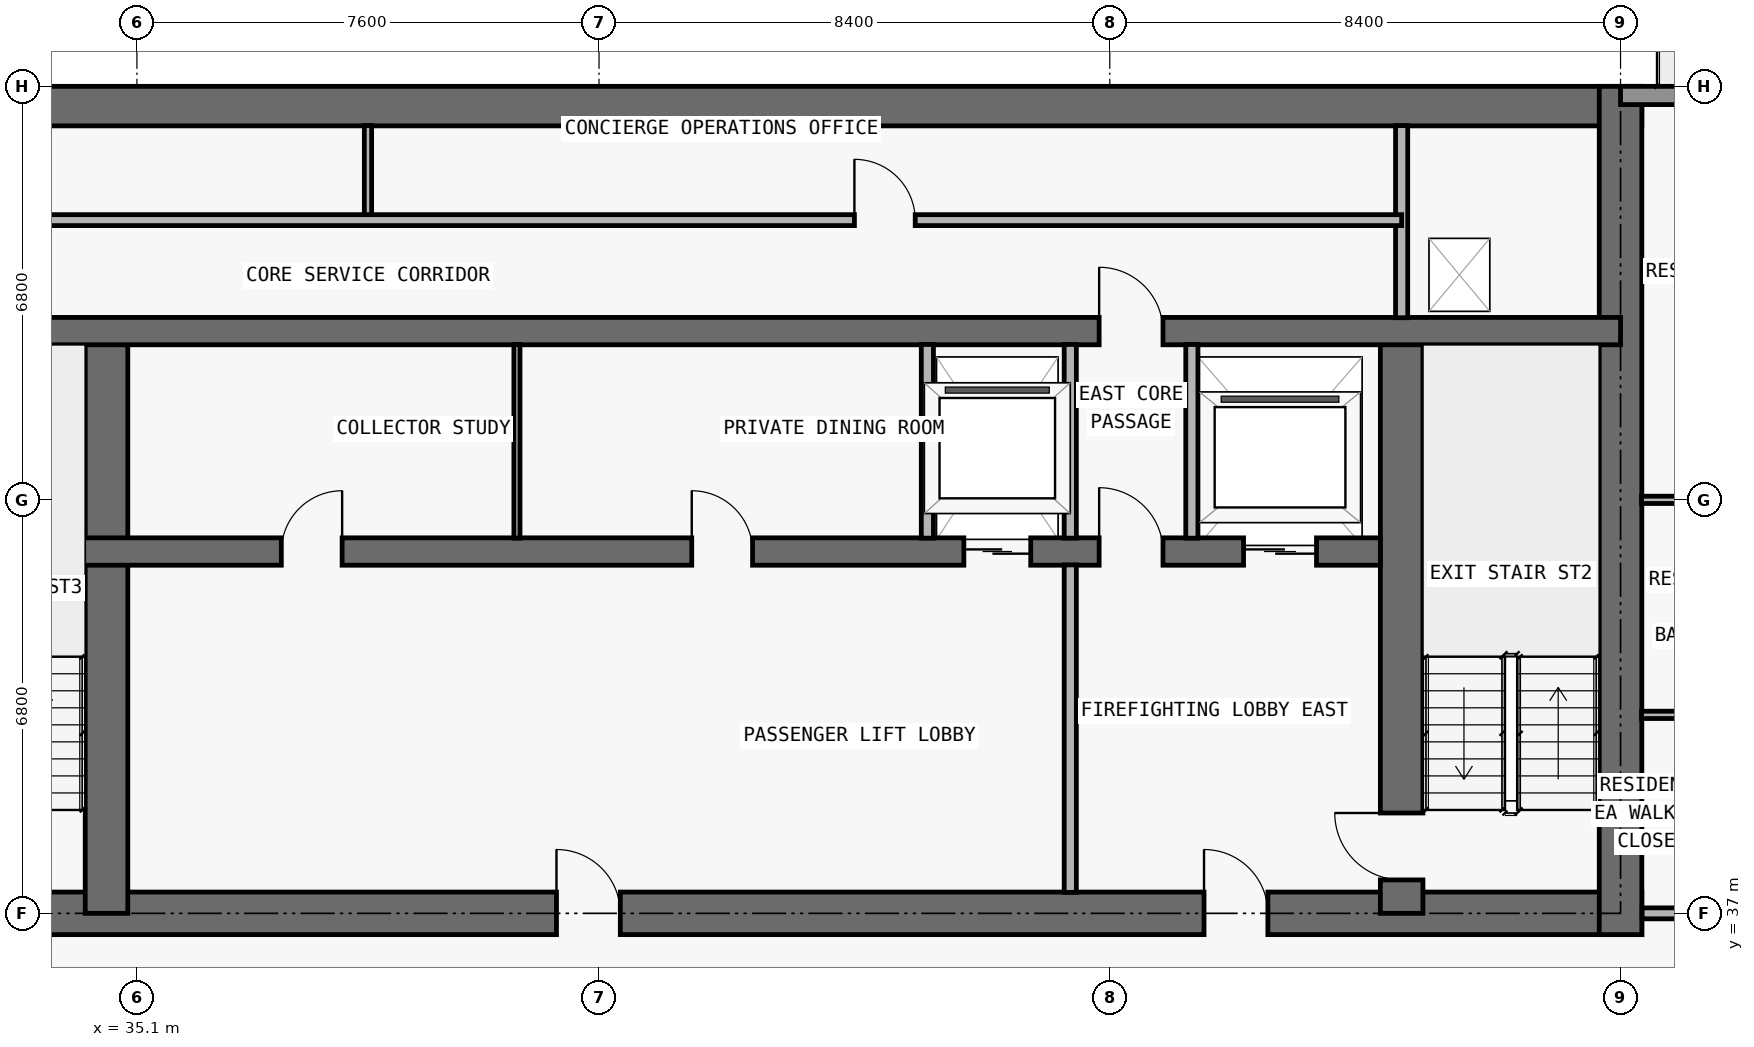
"""IFC4 building model, lengths in metres.
Left out: names, types, materials, properties, quantities, classifications, styles, units other than length and angle.
Written with IfcOpenShell. Run it as: python <this file> out.ifc"""

import sys

from ifc_helpers import new_model, si_unit, direction, frame, frame_2d, origin, place, context, subcontext, project, spatial, rectangle, extrude, element, fill, save


model = new_model("IFC4")
c1 = context("Model", 3, precision=1e-05, world=origin(), true_north=direction((0.0, 1.0)))
c2 = subcontext(c1, "Body", "Model", "MODEL_VIEW")
j1 = project(units=[si_unit("LENGTHUNIT", "METRE"), si_unit("PLANEANGLEUNIT", "RADIAN")], contexts=[c1])
p1 = place(None, origin())
s1 = spatial("IfcSite", under=j1, at=p1, CompositionType="ELEMENT")
p2 = place(p1, origin())
s2 = spatial("IfcBuilding", under=s1, at=p2, CompositionType="ELEMENT")
p3 = place(p2, frame((0.0, 0.0, 256.2)))
s3 = spatial("IfcBuildingStorey", under=s2, at=p3, CompositionType="ELEMENT", Elevation=256.2)
p4 = place(p3, frame((17.95, 37.0, 0.0), z_axis=(0.0, 0.0, 1.0), x_axis=(1.0, 0.0, 0.0)))
e1 = element("IfcWall", 1, at=p4, inside=s3, PredefinedType="SHEAR", context=c2, shape_type="SweptSolid", body=[
    extrude(rectangle(XDim=41.9, YDim=0.7, at=frame_2d((20.95, 0.0))), origin(), (0.0, 0.0, 1.0), 3.05),
])
p5 = place(p4, frame((14.35, 0.0, 0.0)))
e2 = element("IfcOpeningElement", 2, at=p5, cuts=e1, PredefinedType="OPENING", context=c2, shape_type="SweptSolid", body=[
    extrude(rectangle(XDim=1.1, YDim=2.15, at=frame_2d((0.55, 1.075))), frame((0.0, 0.36, 0.0), z_axis=(0.0, -1.0, 0.0), x_axis=(1.0, 0.0, 0.0)), (0.0, 0.0, 1.0), 0.72),
])
p6 = place(p4, frame((6.2, 0.0, 0.0)))
e3 = element("IfcOpeningElement", 3, at=p6, cuts=e1, PredefinedType="OPENING", context=c2, shape_type="SweptSolid", body=[
    extrude(rectangle(XDim=1.05, YDim=2.15, at=frame_2d((0.525, 1.075))), frame((0.0, 0.36, 0.0), z_axis=(0.0, -1.0, 0.0), x_axis=(1.0, 0.0, 0.0)), (0.0, 0.0, 1.0), 0.72),
])
p7 = place(p4, frame((34.7, 0.0, 0.0)))
e4 = element("IfcOpeningElement", 4, at=p7, cuts=e1, PredefinedType="OPENING", context=c2, shape_type="SweptSolid", body=[
    extrude(rectangle(XDim=1.05, YDim=2.15, at=frame_2d((0.525, 1.075))), frame((0.0, 0.36, 0.0), z_axis=(0.0, -1.0, 0.0), x_axis=(1.0, 0.0, 0.0)), (0.0, 0.0, 1.0), 0.72),
])
p8 = place(p4, frame((10.812, 0.0, 0.0)))
e5 = element("IfcOpeningElement", 5, at=p8, cuts=e1, PredefinedType="OPENING", context=c2, shape_type="SweptSolid", body=[
    extrude(rectangle(XDim=1.05, YDim=2.15, at=frame_2d((0.525, 1.075))), frame((0.0, 0.36, 0.0), z_axis=(0.0, -1.0, 0.0), x_axis=(1.0, 0.0, 0.0)), (0.0, 0.0, 1.0), 0.72),
])
p9 = place(p4, frame((24.05, 0.0, 0.0)))
e6 = element("IfcOpeningElement", 6, at=p9, cuts=e1, PredefinedType="OPENING", context=c2, shape_type="SweptSolid", body=[
    extrude(rectangle(XDim=1.05, YDim=2.15, at=frame_2d((0.525, 1.075))), frame((0.0, 0.36, 0.0), z_axis=(0.0, -1.0, 0.0), x_axis=(1.0, 0.0, 0.0)), (0.0, 0.0, 1.0), 0.72),
])
p10 = place(p3, frame((17.95, 50.275, 0.0), z_axis=(0.0, 0.0, 1.0), x_axis=(1.0, 0.0, 0.0)))
e7 = element("IfcWall", 7, at=p10, inside=s3, PredefinedType="SHEAR", context=c2, shape_type="SweptSolid", body=[
    extrude(rectangle(XDim=41.9, YDim=0.65, at=frame_2d((20.95, 0.0))), origin(), (0.0, 0.0, 1.0), 3.05),
])
p11 = place(p3, frame((59.5, 36.65, 0.0), z_axis=(0.0, 0.0, 1.0), x_axis=(0.0, 1.0, 0.0)))
e8 = element("IfcWall", 8, at=p11, inside=s3, PredefinedType="SHEAR", context=c2, shape_type="SweptSolid", body=[
    extrude(rectangle(XDim=13.95, YDim=0.7, at=frame_2d((6.975, 0.0))), origin(), (0.0, 0.0, 1.0), 3.05),
])
p12 = place(p3, frame((55.9, 37.0, 0.0), z_axis=(0.0, 0.0, 1.0), x_axis=(0.0, 1.0, 0.0)))
e9 = element("IfcWall", 9, at=p12, inside=s3, PredefinedType="SHEAR", context=c2, shape_type="SweptSolid", body=[
    extrude(rectangle(XDim=9.575, YDim=0.7, at=frame_2d((4.788, 0.0))), origin(), (0.0, 0.0, 1.0), 3.05),
])
p13 = place(p12, frame((0.55, 0.0, 0.0)))
e10 = element("IfcOpeningElement", 10, at=p13, cuts=e9, PredefinedType="OPENING", context=c2, shape_type="SweptSolid", body=[
    extrude(rectangle(XDim=1.1, YDim=2.15, at=frame_2d((0.55, 1.075))), frame((0.0, 0.36, 0.0), z_axis=(0.0, -1.0, 0.0), x_axis=(1.0, 0.0, 0.0)), (0.0, 0.0, 1.0), 0.72),
])
p14 = place(p3, frame((34.6, 37.0, 0.0), z_axis=(0.0, 0.0, 1.0), x_axis=(0.0, 1.0, 0.0)))
e11 = element("IfcWall", 11, at=p14, inside=s3, PredefinedType="SHEAR", context=c2, shape_type="SweptSolid", body=[
    extrude(rectangle(XDim=9.575, YDim=0.7, at=frame_2d((4.788, 0.0))), origin(), (0.0, 0.0, 1.0), 3.05),
])
p15 = place(p3, frame((22.25, 42.95, 0.0), z_axis=(0.0, 0.0, 1.0), x_axis=(1.0, 0.0, 0.0)))
e12 = element("IfcWall", 12, at=p15, inside=s3, PredefinedType="SHEAR", context=c2, shape_type="SweptSolid", body=[
    extrude(rectangle(XDim=33.3, YDim=0.45, at=frame_2d((16.65, 0.0))), origin(), (0.0, 0.0, 1.0), 3.05),
])
p16 = place(p15, frame((1.05, 0.0, 0.0)))
e13 = element("IfcOpeningElement", 13, at=p16, cuts=e12, PredefinedType="OPENING", context=c2, shape_type="SweptSolid", body=[
    extrude(rectangle(XDim=1.2, YDim=2.2, at=frame_2d((0.6, 1.1))), frame((0.0, 0.235, 0.0), z_axis=(0.0, -1.0, 0.0), x_axis=(1.0, 0.0, 0.0)), (0.0, 0.0, 1.0), 0.47),
])
p17 = place(p15, frame((31.05, 0.0, 0.0)))
e14 = element("IfcOpeningElement", 14, at=p17, cuts=e12, PredefinedType="OPENING", context=c2, shape_type="SweptSolid", body=[
    extrude(rectangle(XDim=1.2, YDim=2.2, at=frame_2d((0.6, 1.1))), frame((0.0, 0.235, 0.0), z_axis=(0.0, -1.0, 0.0), x_axis=(1.0, 0.0, 0.0)), (0.0, 0.0, 1.0), 0.47),
])
p18 = place(p15, frame((26.45, 0.0, 0.0)))
e15 = element("IfcOpeningElement", 15, at=p18, cuts=e12, PredefinedType="OPENING", context=c2, shape_type="SweptSolid", body=[
    extrude(rectangle(XDim=1.1, YDim=2.2, at=frame_2d((0.55, 1.1))), frame((0.0, 0.235, 0.0), z_axis=(0.0, -1.0, 0.0), x_axis=(1.0, 0.0, 0.0)), (0.0, 0.0, 1.0), 0.47),
])
p19 = place(p15, frame((5.95, 0.0, 0.0)))
e16 = element("IfcOpeningElement", 16, at=p19, cuts=e12, PredefinedType="OPENING", context=c2, shape_type="SweptSolid", body=[
    extrude(rectangle(XDim=1.1, YDim=2.2, at=frame_2d((0.55, 1.1))), frame((0.0, 0.235, 0.0), z_axis=(0.0, -1.0, 0.0), x_axis=(1.0, 0.0, 0.0)), (0.0, 0.0, 1.0), 0.47),
])
p20 = place(p15, frame((3.625, 0.0, 0.0)))
e17 = element("IfcOpeningElement", 17, at=p20, cuts=e12, PredefinedType="OPENING", context=c2, shape_type="SweptSolid", body=[
    extrude(rectangle(XDim=1.05, YDim=2.15, at=frame_2d((0.525, 1.075))), frame((0.0, 0.235, 0.0), z_axis=(0.0, -1.0, 0.0), x_axis=(1.0, 0.0, 0.0)), (0.0, 0.0, 1.0), 0.47),
])
p21 = place(p15, frame((28.675, 0.0, 0.0)))
e18 = element("IfcOpeningElement", 18, at=p21, cuts=e12, PredefinedType="OPENING", context=c2, shape_type="SweptSolid", body=[
    extrude(rectangle(XDim=1.05, YDim=2.15, at=frame_2d((0.525, 1.075))), frame((0.0, 0.235, 0.0), z_axis=(0.0, -1.0, 0.0), x_axis=(1.0, 0.0, 0.0)), (0.0, 0.0, 1.0), 0.47),
])
p22 = place(p15, frame((15.225, 0.0, 0.0)))
e19 = element("IfcOpeningElement", 19, at=p22, cuts=e12, PredefinedType="OPENING", context=c2, shape_type="SweptSolid", body=[
    extrude(rectangle(XDim=1.0, YDim=2.2, at=frame_2d((0.5, 1.1))), frame((0.0, 0.235, 0.0), z_axis=(0.0, -1.0, 0.0), x_axis=(1.0, 0.0, 0.0)), (0.0, 0.0, 1.0), 0.47),
])
p23 = place(p15, frame((21.975, 0.0, 0.0)))
e20 = element("IfcOpeningElement", 20, at=p23, cuts=e12, PredefinedType="OPENING", context=c2, shape_type="SweptSolid", body=[
    extrude(rectangle(XDim=1.0, YDim=2.2, at=frame_2d((0.5, 1.1))), frame((0.0, 0.235, 0.0), z_axis=(0.0, -1.0, 0.0), x_axis=(1.0, 0.0, 0.0)), (0.0, 0.0, 1.0), 0.47),
])
p24 = place(p3, frame((18.3, 46.575, 0.0), z_axis=(0.0, 0.0, 1.0), x_axis=(1.0, 0.0, 0.0)))
e21 = element("IfcWall", 21, at=p24, inside=s3, PredefinedType="SHEAR", context=c2, shape_type="SweptSolid", body=[
    extrude(rectangle(XDim=41.2, YDim=0.45, at=frame_2d((20.6, 0.0))), origin(), (0.0, 0.0, 1.0), 3.05),
])
p25 = place(p24, frame((7.575, 0.0, 0.0)))
e22 = element("IfcOpeningElement", 22, at=p25, cuts=e21, PredefinedType="OPENING", context=c2, shape_type="SweptSolid", body=[
    extrude(rectangle(XDim=1.05, YDim=2.15, at=frame_2d((0.525, 1.075))), frame((0.0, 0.235, 0.0), z_axis=(0.0, -1.0, 0.0), x_axis=(1.0, 0.0, 0.0)), (0.0, 0.0, 1.0), 0.47),
])
p26 = place(p24, frame((32.625, 0.0, 0.0)))
e23 = element("IfcOpeningElement", 23, at=p26, cuts=e21, PredefinedType="OPENING", context=c2, shape_type="SweptSolid", body=[
    extrude(rectangle(XDim=1.05, YDim=2.15, at=frame_2d((0.525, 1.075))), frame((0.0, 0.235, 0.0), z_axis=(0.0, -1.0, 0.0), x_axis=(1.0, 0.0, 0.0)), (0.0, 0.0, 1.0), 0.47),
])
p27 = place(p3, frame((59.5, 50.45, 0.0), z_axis=(0.0, 0.0, 1.0), x_axis=(1.0, 0.0, 0.0)))
e24 = element("IfcWall", 24, at=p27, inside=s3, PredefinedType="STANDARD", context=c2, shape_type="SweptSolid", body=[
    extrude(rectangle(XDim=6.2, YDim=0.3, at=frame_2d((3.1, 0.0))), origin(), (0.0, 0.0, 1.0), 3.05),
])
p28 = place(p27, frame((2.1, 0.0, 0.0)))
e25 = element("IfcOpeningElement", 25, at=p28, cuts=e24, PredefinedType="OPENING", context=c2, shape_type="SweptSolid", body=[
    extrude(rectangle(XDim=2.0, YDim=2.3, at=frame_2d((1.0, 1.15))), frame((0.0, 0.16, 0.0), z_axis=(0.0, -1.0, 0.0), x_axis=(1.0, 0.0, 0.0)), (0.0, 0.0, 1.0), 0.32),
])
p29 = place(p3, frame((38.9, 48.4, 0.0), z_axis=(0.0, 0.0, 1.0), x_axis=(0.0, 1.0, 0.0)))
e26 = element("IfcWall", 26, at=p29, inside=s3, PredefinedType="PARTITIONING", context=c2, shape_type="SweptSolid", body=[
    extrude(rectangle(XDim=1.555, YDim=0.12, at=frame_2d((0.778, 0.0))), origin(), (0.0, 0.0, 1.0), 3.05),
])
p30 = place(p3, frame((41.35, 43.17, 0.0), z_axis=(0.0, 0.0, 1.0), x_axis=(0.0, 1.0, 0.0)))
e27 = element("IfcWall", 27, at=p30, inside=s3, PredefinedType="MOVABLE", context=c2, shape_type="SweptSolid", body=[
    extrude(rectangle(XDim=3.185, YDim=0.1, at=frame_2d((1.593, 0.0))), origin(), (0.0, 0.0, 1.0), 3.05),
])
p31 = place(p3, frame((48.1, 43.17, 0.0), z_axis=(0.0, 0.0, 1.0), x_axis=(0.0, 1.0, 0.0)))
e28 = element("IfcWall", 28, at=p31, inside=s3, PredefinedType="PARTITIONING", context=c2, shape_type="SweptSolid", body=[
    extrude(rectangle(XDim=3.185, YDim=0.2, at=frame_2d((1.593, 0.0))), origin(), (0.0, 0.0, 1.0), 3.05),
])
p32 = place(p3, frame((50.45, 37.345, 0.0), z_axis=(0.0, 0.0, 1.0), x_axis=(0.0, 1.0, 0.0)))
e29 = element("IfcWall", 29, at=p32, inside=s3, PredefinedType="PARTITIONING", context=c2, shape_type="SweptSolid", body=[
    extrude(rectangle(XDim=5.385, YDim=0.2, at=frame_2d((2.692, 0.0))), origin(), (0.0, 0.0, 1.0), 3.05),
])
for number, where, z_axis, x_axis in (
    (30, (50.45, 43.17, 0.0), (0.0, 0.0, 1.0), (0.0, 1.0, 0.0)),
    (31, (52.45, 43.17, 0.0), (0.0, 0.0, 1.0), (0.0, 1.0, 0.0)),
):
    element("IfcWall", number, at=place(p3, frame(where, z_axis=z_axis, x_axis=x_axis)), inside=s3, PredefinedType="PARTITIONING", context=c2, shape_type="SweptSolid", body=[
        extrude(rectangle(XDim=3.185, YDim=0.2, at=frame_2d((1.593, 0.0))), origin(), (0.0, 0.0, 1.0), 3.05),
    ])
p33 = place(p3, frame((55.9, 46.795, 0.0), z_axis=(0.0, 0.0, 1.0), x_axis=(0.0, 1.0, 0.0)))
e32 = element("IfcWall", 32, at=p33, inside=s3, PredefinedType="PARTITIONING", context=c2, shape_type="SweptSolid", body=[
    extrude(rectangle(XDim=3.16, YDim=0.2, at=frame_2d((1.58, 0.0))), origin(), (0.0, 0.0, 1.0), 3.05),
])
p34 = place(p3, frame((59.855, 37.0, 0.0), z_axis=(0.0, 0.0, 1.0), x_axis=(1.0, 0.0, 0.0)))
e33 = element("IfcWall", 33, at=p34, inside=s3, PredefinedType="PARTITIONING", context=c2, shape_type="SweptSolid", body=[
    extrude(rectangle(XDim=5.845, YDim=0.18, at=frame_2d((2.922, 0.0))), origin(), (0.0, 0.0, 1.0), 3.05),
])
p35 = place(p34, frame((3.57, 0.0, 0.0)))
e34 = element("IfcOpeningElement", 34, at=p35, cuts=e33, PredefinedType="OPENING", context=c2, shape_type="SweptSolid", body=[
    extrude(rectangle(XDim=1.0, YDim=2.2, at=frame_2d((0.5, 1.1))), frame((0.0, 0.1, 0.0), z_axis=(0.0, -1.0, 0.0), x_axis=(1.0, 0.0, 0.0)), (0.0, 0.0, 1.0), 0.2),
])
p36 = place(p3, frame((59.845, 40.264, 0.0), z_axis=(0.0, 0.0, 1.0), x_axis=(1.0, 0.0, 0.0)))
e35 = element("IfcWall", 35, at=p36, inside=s3, PredefinedType="PARTITIONING", context=c2, shape_type="SweptSolid", body=[
    extrude(rectangle(XDim=2.305, YDim=0.12, at=frame_2d((1.152, 0.0))), origin(), (0.0, 0.0, 1.0), 3.05),
])
p37 = place(p3, frame((59.845, 43.8, 0.0), z_axis=(0.0, 0.0, 1.0), x_axis=(1.0, 0.0, 0.0)))
e36 = element("IfcWall", 36, at=p37, inside=s3, PredefinedType="PARTITIONING", context=c2, shape_type="SweptSolid", body=[
    extrude(rectangle(XDim=9.56, YDim=0.12, at=frame_2d((4.78, 0.0))), origin(), (0.0, 0.0, 1.0), 2.418),
])
p38 = place(p37, frame((3.63, 0.0, 0.0)))
e37 = element("IfcOpeningElement", 37, at=p38, cuts=e36, PredefinedType="OPENING", context=c2, shape_type="SweptSolid", body=[
    extrude(rectangle(XDim=0.9, YDim=2.15, at=frame_2d((0.45, 1.075))), frame((0.0, 0.07, 0.0), z_axis=(0.0, -1.0, 0.0), x_axis=(1.0, 0.0, 0.0)), (0.0, 0.0, 1.0), 0.14),
])
p39 = place(p37, frame((0.728, 0.0, 0.0)))
e38 = element("IfcOpeningElement", 38, at=p39, cuts=e36, PredefinedType="OPENING", context=c2, shape_type="SweptSolid", body=[
    extrude(rectangle(XDim=0.85, YDim=2.1, at=frame_2d((0.425, 1.05))), frame((0.0, 0.07, 0.0), z_axis=(0.0, -1.0, 0.0), x_axis=(1.0, 0.0, 0.0)), (0.0, 0.0, 1.0), 0.14),
])
p40 = place(p3, frame((21.9, 48.4, 0.0), z_axis=(0.0, 0.0, 1.0), x_axis=(1.0, 0.0, 0.0)))
e39 = element("IfcWall", 39, at=p40, inside=s3, PredefinedType="PARTITIONING", context=c2, shape_type="SweptSolid", body=[
    extrude(rectangle(XDim=34.0, YDim=0.18, at=frame_2d((17.0, 0.0))), origin(), (0.0, 0.0, 1.0), 3.05),
])
p41 = place(p40, frame((8.0, 0.0, 0.0)))
e40 = element("IfcOpeningElement", 40, at=p41, cuts=e39, PredefinedType="OPENING", context=c2, shape_type="SweptSolid", body=[
    extrude(rectangle(XDim=1.0, YDim=2.2, at=frame_2d((0.5, 1.1))), frame((0.0, 0.1, 0.0), z_axis=(0.0, -1.0, 0.0), x_axis=(1.0, 0.0, 0.0)), (0.0, 0.0, 1.0), 0.2),
])
p42 = place(p40, frame((25.0, 0.0, 0.0)))
e41 = element("IfcOpeningElement", 41, at=p42, cuts=e39, PredefinedType="OPENING", context=c2, shape_type="SweptSolid", body=[
    extrude(rectangle(XDim=1.0, YDim=2.2, at=frame_2d((0.5, 1.1))), frame((0.0, 0.1, 0.0), z_axis=(0.0, -1.0, 0.0), x_axis=(1.0, 0.0, 0.0)), (0.0, 0.0, 1.0), 0.2),
])
p43 = place(p17, origin())
e42 = element("IfcDoor", 42, at=p43, inside=s3, OperationType="DOUBLE_DOOR_SLIDING", PredefinedType="DOOR", context=c2, shape_type="SweptSolid", body=[
    extrude(rectangle(XDim=1.2, YDim=2.2, at=frame_2d((0.6, 1.1))), frame((0.0, 0.025, 0.0), z_axis=(0.0, -1.0, 0.0), x_axis=(1.0, 0.0, 0.0)), (0.0, 0.0, 1.0), 0.05),
])
fill(e14, e42)
p44 = place(p18, origin())
e43 = element("IfcDoor", 43, at=p44, inside=s3, OperationType="DOUBLE_DOOR_SLIDING", PredefinedType="DOOR", context=c2, shape_type="SweptSolid", body=[
    extrude(rectangle(XDim=1.1, YDim=2.2, at=frame_2d((0.55, 1.1))), frame((0.0, 0.025, 0.0), z_axis=(0.0, -1.0, 0.0), x_axis=(1.0, 0.0, 0.0)), (0.0, 0.0, 1.0), 0.05),
])
fill(e15, e43)
p45 = place(p7, origin())
e44 = element("IfcDoor", 44, at=p45, inside=s3, OperationType="SINGLE_SWING_LEFT", PredefinedType="DOOR", context=c2, shape_type="SweptSolid", body=[
    extrude(rectangle(XDim=1.05, YDim=2.15, at=frame_2d((0.525, 1.075))), frame((0.0, 0.025, 0.0), z_axis=(0.0, -1.0, 0.0), x_axis=(1.0, 0.0, 0.0)), (0.0, 0.0, 1.0), 0.05),
])
fill(e4, e44)
p46 = place(p13, origin())
e45 = element("IfcDoor", 45, at=p46, inside=s3, OperationType="SINGLE_SWING_RIGHT", PredefinedType="DOOR", context=c2, shape_type="SweptSolid", body=[
    extrude(rectangle(XDim=1.1, YDim=2.15, at=frame_2d((0.55, 1.075))), frame((0.0, 0.025, 0.0), z_axis=(0.0, -1.0, 0.0), x_axis=(1.0, 0.0, 0.0)), (0.0, 0.0, 1.0), 0.05),
])
fill(e10, e45)
p47 = place(p21, origin())
e46 = element("IfcDoor", 46, at=p47, inside=s3, OperationType="SINGLE_SWING_LEFT", PredefinedType="DOOR", context=c2, shape_type="SweptSolid", body=[
    extrude(rectangle(XDim=1.05, YDim=2.15, at=frame_2d((0.525, 1.075))), frame((0.0, 0.025, 0.0), z_axis=(0.0, -1.0, 0.0), x_axis=(1.0, 0.0, 0.0)), (0.0, 0.0, 1.0), 0.05),
])
fill(e18, e46)
p48 = place(p9, origin())
e47 = element("IfcDoor", 47, at=p48, inside=s3, OperationType="SINGLE_SWING_LEFT", PredefinedType="DOOR", context=c2, shape_type="SweptSolid", body=[
    extrude(rectangle(XDim=1.05, YDim=2.15, at=frame_2d((0.525, 1.075))), frame((0.0, 0.025, 0.0), z_axis=(0.0, -1.0, 0.0), x_axis=(1.0, 0.0, 0.0)), (0.0, 0.0, 1.0), 0.05),
])
fill(e6, e47)
p49 = place(p22, origin())
e48 = element("IfcDoor", 48, at=p49, inside=s3, OperationType="SINGLE_SWING_RIGHT", PredefinedType="DOOR", context=c2, shape_type="SweptSolid", body=[
    extrude(rectangle(XDim=1.0, YDim=2.2, at=frame_2d((0.5, 1.1))), frame((0.0, 0.025, 0.0), z_axis=(0.0, -1.0, 0.0), x_axis=(1.0, 0.0, 0.0)), (0.0, 0.0, 1.0), 0.05),
])
fill(e19, e48)
p50 = place(p23, origin())
e49 = element("IfcDoor", 49, at=p50, inside=s3, OperationType="SINGLE_SWING_LEFT", PredefinedType="DOOR", context=c2, shape_type="SweptSolid", body=[
    extrude(rectangle(XDim=1.0, YDim=2.2, at=frame_2d((0.5, 1.1))), frame((0.0, 0.025, 0.0), z_axis=(0.0, -1.0, 0.0), x_axis=(1.0, 0.0, 0.0)), (0.0, 0.0, 1.0), 0.05),
])
fill(e20, e49)
p51 = place(p26, origin())
e50 = element("IfcDoor", 50, at=p51, inside=s3, OperationType="SINGLE_SWING_LEFT", PredefinedType="DOOR", context=c2, shape_type="SweptSolid", body=[
    extrude(rectangle(XDim=1.05, YDim=2.15, at=frame_2d((0.525, 1.075))), frame((0.0, 0.025, 0.0), z_axis=(0.0, -1.0, 0.0), x_axis=(1.0, 0.0, 0.0)), (0.0, 0.0, 1.0), 0.05),
])
fill(e23, e50)
p52 = place(p42, origin())
e51 = element("IfcDoor", 51, at=p52, inside=s3, OperationType="SINGLE_SWING_LEFT", PredefinedType="DOOR", context=c2, shape_type="SweptSolid", body=[
    extrude(rectangle(XDim=1.0, YDim=2.2, at=frame_2d((0.5, 1.1))), frame((0.0, 0.025, 0.0), z_axis=(0.0, -1.0, 0.0), x_axis=(1.0, 0.0, 0.0)), (0.0, 0.0, 1.0), 0.05),
])
fill(e41, e51)
save(model, sys.argv[1])
